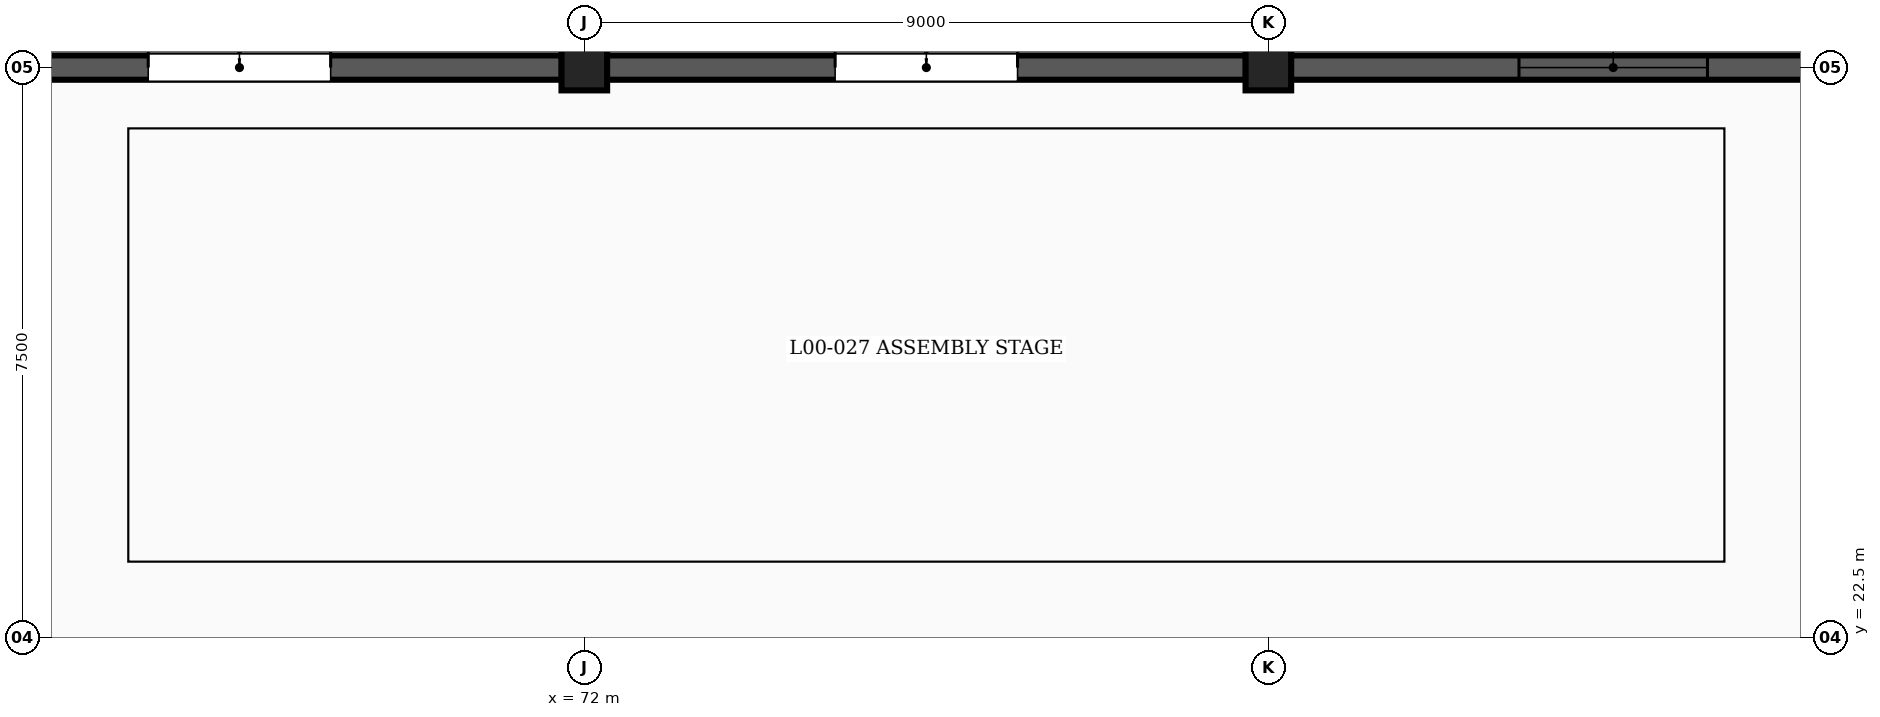
"""IFC4 building model, lengths in metres.
Left out: names, types, materials, properties, quantities, classifications, styles, units other than length and angle.
Written with IfcOpenShell. Run it as: python <this file> out.ifc"""

import sys

from ifc_helpers import new_model, si_unit, direction, frame, frame_2d, origin, origin_2d, place, context, subcontext, project, spatial, rectangle, extrude, element, fill, save


model = new_model("IFC4")
c1 = context("Model", 3, precision=1e-05, world=origin(), true_north=direction((0.0, 1.0)))
c2 = subcontext(c1, "Body", "Model", "MODEL_VIEW")
j1 = project(units=[si_unit("LENGTHUNIT", "METRE"), si_unit("PLANEANGLEUNIT", "RADIAN")], contexts=[c1])
p1 = place(None, origin())
s1 = spatial("IfcSite", under=j1, at=p1, CompositionType="ELEMENT")
p2 = place(p1, origin())
s2 = spatial("IfcBuilding", under=s1, at=p2, CompositionType="ELEMENT")
p3 = place(p2, origin())
s3 = spatial("IfcBuildingStorey", under=s2, at=p3, CompositionType="ELEMENT", Elevation=0.0)
for number, where, z_axis, x_axis in (
    (1, (72.0, 30.0, -0.25), (0.0, 0.0, 1.0), (1.0, 0.0, 0.0)),
    (2, (81.0, 30.0, -0.25), (0.0, 0.0, 1.0), (1.0, 0.0, 0.0)),
):
    element("IfcColumn", number, at=place(p3, frame(where, z_axis=z_axis, x_axis=x_axis)), inside=s3, PredefinedType="COLUMN", context=c2, shape_type="SweptSolid", body=[
        extrude(rectangle(XDim=0.6, YDim=0.6, at=origin_2d()), origin(), (0.0, 0.0, 1.0), 4.75),
    ])
p4 = place(p3, frame((63.221, 30.0, 0.0), z_axis=(0.0, 0.0, 1.0), x_axis=(1.0, 0.0, 0.0)))
e3 = element("IfcWall", 3, at=p4, inside=s3, PredefinedType="SOLIDWALL", context=c2, shape_type="SweptSolid", body=[
    extrude(rectangle(XDim=8.483, YDim=0.32, at=frame_2d((4.242, 0.0))), origin(), (0.0, 0.0, 1.0), 4.1),
])
p5 = place(p4, frame((3.042, 0.0, 0.0)))
e4 = element("IfcOpeningElement", 4, at=p5, cuts=e3, PredefinedType="OPENING", context=c2, shape_type="SweptSolid", body=[
    extrude(rectangle(XDim=2.4, YDim=2.25, at=frame_2d((1.2, 1.125))), frame((0.0, 0.17, 0.0), z_axis=(0.0, -1.0, 0.0), x_axis=(1.0, 0.0, 0.0)), (0.0, 0.0, 1.0), 0.34),
])
p6 = place(p3, frame((72.296, 30.0, 0.0), z_axis=(0.0, 0.0, 1.0), x_axis=(1.0, 0.0, 0.0)))
e5 = element("IfcWall", 5, at=p6, inside=s3, PredefinedType="SOLIDWALL", context=c2, shape_type="SweptSolid", body=[
    extrude(rectangle(XDim=8.408, YDim=0.32, at=frame_2d((4.204, 0.0))), origin(), (0.0, 0.0, 1.0), 4.1),
])
p7 = place(p6, frame((3.004, 0.0, 0.0)))
e6 = element("IfcOpeningElement", 6, at=p7, cuts=e5, PredefinedType="OPENING", context=c2, shape_type="SweptSolid", body=[
    extrude(rectangle(XDim=2.4, YDim=2.25, at=frame_2d((1.2, 1.125))), frame((0.0, 0.17, 0.0), z_axis=(0.0, -1.0, 0.0), x_axis=(1.0, 0.0, 0.0)), (0.0, 0.0, 1.0), 0.34),
])
p8 = place(p3, frame((81.296, 30.0, 0.0), z_axis=(0.0, 0.0, 1.0), x_axis=(1.0, 0.0, 0.0)))
e7 = element("IfcWall", 7, at=p8, inside=s3, PredefinedType="SOLIDWALL", context=c2, shape_type="SweptSolid", body=[
    extrude(rectangle(XDim=8.483, YDim=0.32, at=frame_2d((4.242, 0.0))), origin(), (0.0, 0.0, 1.0), 4.1),
])
p9 = place(p8, frame((3.001, 0.0, 0.95)))
e8 = element("IfcOpeningElement", 8, at=p9, cuts=e7, PredefinedType="OPENING", context=c2, shape_type="SweptSolid", body=[
    extrude(rectangle(XDim=2.48, YDim=1.62, at=frame_2d((1.24, 0.81))), frame((0.0, 0.17, 0.0), z_axis=(0.0, -1.0, 0.0), x_axis=(1.0, 0.0, 0.0)), (0.0, 0.0, 1.0), 0.34),
])
p10 = place(p5, origin())
e9 = element("IfcDoor", 9, at=p10, inside=s3, OperationType="DOUBLE_DOOR_SINGLE_SWING", PredefinedType="DOOR", context=c2, shape_type="SweptSolid", body=[
    extrude(rectangle(XDim=2.4, YDim=2.25, at=frame_2d((1.2, 1.125))), frame((0.0, 0.025, 0.0), z_axis=(0.0, -1.0, 0.0), x_axis=(1.0, 0.0, 0.0)), (0.0, 0.0, 1.0), 0.05),
])
fill(e4, e9)
p11 = place(p7, origin())
e10 = element("IfcDoor", 10, at=p11, inside=s3, OperationType="DOUBLE_DOOR_SINGLE_SWING", PredefinedType="DOOR", context=c2, shape_type="SweptSolid", body=[
    extrude(rectangle(XDim=2.4, YDim=2.25, at=frame_2d((1.2, 1.125))), frame((0.0, 0.025, 0.0), z_axis=(0.0, -1.0, 0.0), x_axis=(1.0, 0.0, 0.0)), (0.0, 0.0, 1.0), 0.05),
])
fill(e6, e10)
p12 = place(p9, origin())
e11 = element("IfcWindow", 11, at=p12, inside=s3, PartitioningType="DOUBLE_PANEL_VERTICAL", PredefinedType="WINDOW", context=c2, shape_type="SweptSolid", body=[
    extrude(rectangle(XDim=2.48, YDim=1.62, at=frame_2d((1.24, 0.81))), frame((0.0, 0.03, 0.0), z_axis=(0.0, -1.0, 0.0), x_axis=(1.0, 0.0, 0.0)), (0.0, 0.0, 1.0), 0.06),
])
fill(e8, e11)
save(model, sys.argv[1])
